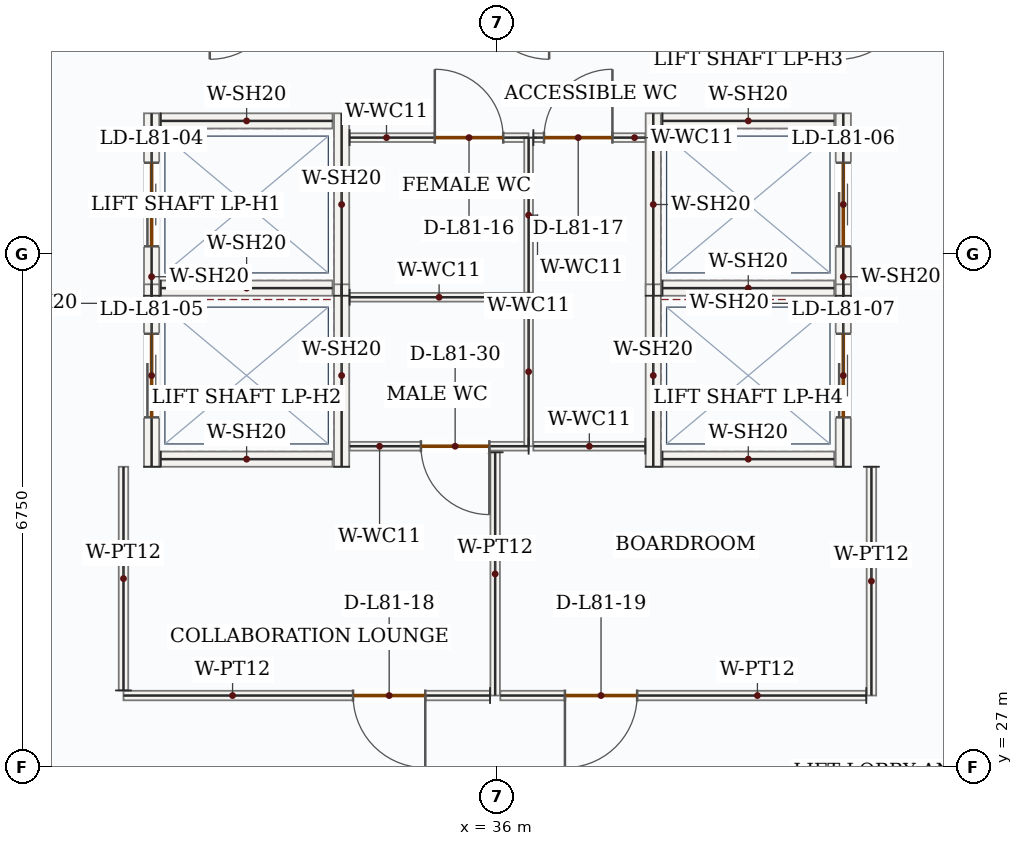
"""IFC4 building model, lengths in metres.
Left out: names, types, materials, properties, quantities, classifications, styles, units other than length and angle.
Written with IfcOpenShell. Run it as: python <this file> out.ifc"""

import sys

from ifc_helpers import new_model, si_unit, direction, frame, frame_2d, origin, place, context, subcontext, project, spatial, rectangle, extrude, source, transform, mapped, element, fill, save


model = new_model("IFC4")
c1 = context("Model", 3, precision=1e-05, world=origin(), true_north=direction((0.0, 1.0)))
c2 = subcontext(c1, "Body", "Model", "MODEL_VIEW")
j1 = project(units=[si_unit("LENGTHUNIT", "METRE"), si_unit("PLANEANGLEUNIT", "RADIAN")], contexts=[c1])
p1 = place(None, origin())
s1 = spatial("IfcSite", under=j1, at=p1, CompositionType="ELEMENT")
p2 = place(p1, origin())
s2 = spatial("IfcBuilding", under=s1, at=p2, CompositionType="ELEMENT")
p3 = place(p2, frame((0.0, 0.0, 334.8)))
s3 = spatial("IfcBuildingStorey", under=s2, at=p3, CompositionType="ELEMENT", Elevation=334.8)
p4 = place(p3, frame((31.45, 33.2, 0.0), z_axis=(0.0, 0.0, 1.0), x_axis=(0.0, 1.0, 0.0)))
e1 = element("IfcWall", 1, at=p4, inside=s3, PredefinedType="SOLIDWALL", context=c2, shape_type="SweptSolid", body=[
    extrude(rectangle(XDim=2.4, YDim=0.2, at=frame_2d((1.2, 0.0))), origin(), (0.0, 0.0, 1.0), 3.5),
])
p5 = place(p4, frame((0.65, 0.0, 0.0)))
e2 = element("IfcOpeningElement", 2, at=p5, cuts=e1, PredefinedType="OPENING", context=c2, shape_type="SweptSolid", body=[
    extrude(rectangle(XDim=1.1, YDim=2.15, at=frame_2d((0.55, 1.075))), frame((0.0, 0.11, 0.0), z_axis=(0.0, -1.0, 0.0), x_axis=(1.0, 0.0, 0.0)), (0.0, 0.0, 1.0), 0.22),
])
m1 = source(origin(), c2, "Body", "SweptSolid", [
    extrude(rectangle(XDim=2.4, YDim=0.2, at=frame_2d((1.2, 0.0))), origin(), (0.0, 0.0, 1.0), 3.5),
])
p6 = place(p3, frame((33.95, 33.2, 0.0), z_axis=(0.0, 0.0, 1.0), x_axis=(0.0, 1.0, 0.0)))
e3 = element("IfcWall", 3, at=p6, inside=s3, PredefinedType="SOLIDWALL", context=c2, shape_type="MappedRepresentation", body=[
    mapped(m1, transform((0.0, 0.0, 0.0), x_axis=(1.0, 0.0, 0.0), y_axis=(0.0, 1.0, 0.0), z_axis=(0.0, 0.0, 1.0), scale=1.0)),
])
m2 = source(origin(), c2, "Body", "SweptSolid", [
    extrude(rectangle(XDim=2.26, YDim=0.2, at=frame_2d((1.13, 0.0))), origin(), (0.0, 0.0, 1.0), 3.5),
])
for number, where, z_axis, x_axis in (
    (4, (31.57, 33.3, 0.0), (0.0, 0.0, 1.0), (1.0, 0.0, 0.0)),
    (5, (31.57, 35.5, 0.0), (0.0, 0.0, 1.0), (1.0, 0.0, 0.0)),
):
    element("IfcWall", number, at=place(p3, frame(where, z_axis=z_axis, x_axis=x_axis)), inside=s3, PredefinedType="SOLIDWALL", context=c2, shape_type="MappedRepresentation", body=[
        mapped(m2, transform((0.0, 0.0, 0.0), x_axis=(1.0, 0.0, 0.0), y_axis=(0.0, 1.0, 0.0), z_axis=(0.0, 0.0, 1.0), scale=1.0)),
    ])
p7 = place(p3, frame((31.45, 30.95, 0.0), z_axis=(0.0, 0.0, 1.0), x_axis=(0.0, 1.0, 0.0)))
e6 = element("IfcWall", 6, at=p7, inside=s3, PredefinedType="SOLIDWALL", context=c2, shape_type="SweptSolid", body=[
    extrude(rectangle(XDim=2.4, YDim=0.2, at=frame_2d((1.2, 0.0))), origin(), (0.0, 0.0, 1.0), 3.5),
])
p8 = place(p7, frame((0.65, 0.0, 0.0)))
e7 = element("IfcOpeningElement", 7, at=p8, cuts=e6, PredefinedType="OPENING", context=c2, shape_type="SweptSolid", body=[
    extrude(rectangle(XDim=1.1, YDim=2.15, at=frame_2d((0.55, 1.075))), frame((0.0, 0.11, 0.0), z_axis=(0.0, -1.0, 0.0), x_axis=(1.0, 0.0, 0.0)), (0.0, 0.0, 1.0), 0.22),
])
p9 = place(p3, frame((33.95, 30.95, 0.0), z_axis=(0.0, 0.0, 1.0), x_axis=(0.0, 1.0, 0.0)))
e8 = element("IfcWall", 8, at=p9, inside=s3, PredefinedType="SOLIDWALL", context=c2, shape_type="MappedRepresentation", body=[
    mapped(m1, transform((0.0, 0.0, 0.0), x_axis=(1.0, 0.0, 0.0), y_axis=(0.0, 1.0, 0.0), z_axis=(0.0, 0.0, 1.0), scale=1.0)),
])
p10 = place(p3, frame((31.57, 31.05, 0.0), z_axis=(0.0, 0.0, 1.0), x_axis=(1.0, 0.0, 0.0)))
e9 = element("IfcWall", 9, at=p10, inside=s3, PredefinedType="SOLIDWALL", context=c2, shape_type="MappedRepresentation", body=[
    mapped(m2, transform((0.0, 0.0, 0.0), x_axis=(1.0, 0.0, 0.0), y_axis=(0.0, 1.0, 0.0), z_axis=(0.0, 0.0, 1.0), scale=1.0)),
])
p11 = place(p3, frame((38.05, 33.2, 0.0), z_axis=(0.0, 0.0, 1.0), x_axis=(0.0, 1.0, 0.0)))
e10 = element("IfcWall", 10, at=p11, inside=s3, PredefinedType="SOLIDWALL", context=c2, shape_type="MappedRepresentation", body=[
    mapped(m1, transform((0.0, 0.0, 0.0), x_axis=(1.0, 0.0, 0.0), y_axis=(0.0, 1.0, 0.0), z_axis=(0.0, 0.0, 1.0), scale=1.0)),
])
p12 = place(p3, frame((40.55, 33.2, 0.0), z_axis=(0.0, 0.0, 1.0), x_axis=(0.0, 1.0, 0.0)))
e11 = element("IfcWall", 11, at=p12, inside=s3, PredefinedType="SOLIDWALL", context=c2, shape_type="SweptSolid", body=[
    extrude(rectangle(XDim=2.4, YDim=0.2, at=frame_2d((1.2, 0.0))), origin(), (0.0, 0.0, 1.0), 3.5),
])
p13 = place(p12, frame((0.65, 0.0, 0.0)))
e12 = element("IfcOpeningElement", 12, at=p13, cuts=e11, PredefinedType="OPENING", context=c2, shape_type="SweptSolid", body=[
    extrude(rectangle(XDim=1.1, YDim=2.15, at=frame_2d((0.55, 1.075))), frame((0.0, 0.11, 0.0), z_axis=(0.0, -1.0, 0.0), x_axis=(1.0, 0.0, 0.0)), (0.0, 0.0, 1.0), 0.22),
])
for number, where, z_axis, x_axis in (
    (13, (38.17, 33.3, 0.0), (0.0, 0.0, 1.0), (1.0, 0.0, 0.0)),
    (14, (38.17, 35.5, 0.0), (0.0, 0.0, 1.0), (1.0, 0.0, 0.0)),
):
    element("IfcWall", number, at=place(p3, frame(where, z_axis=z_axis, x_axis=x_axis)), inside=s3, PredefinedType="SOLIDWALL", context=c2, shape_type="MappedRepresentation", body=[
        mapped(m2, transform((0.0, 0.0, 0.0), x_axis=(1.0, 0.0, 0.0), y_axis=(0.0, 1.0, 0.0), z_axis=(0.0, 0.0, 1.0), scale=1.0)),
    ])
p14 = place(p3, frame((38.05, 30.95, 0.0), z_axis=(0.0, 0.0, 1.0), x_axis=(0.0, 1.0, 0.0)))
e15 = element("IfcWall", 15, at=p14, inside=s3, PredefinedType="SOLIDWALL", context=c2, shape_type="MappedRepresentation", body=[
    mapped(m1, transform((0.0, 0.0, 0.0), x_axis=(1.0, 0.0, 0.0), y_axis=(0.0, 1.0, 0.0), z_axis=(0.0, 0.0, 1.0), scale=1.0)),
])
p15 = place(p3, frame((40.55, 30.95, 0.0), z_axis=(0.0, 0.0, 1.0), x_axis=(0.0, 1.0, 0.0)))
e16 = element("IfcWall", 16, at=p15, inside=s3, PredefinedType="SOLIDWALL", context=c2, shape_type="SweptSolid", body=[
    extrude(rectangle(XDim=2.4, YDim=0.2, at=frame_2d((1.2, 0.0))), origin(), (0.0, 0.0, 1.0), 3.5),
])
p16 = place(p15, frame((0.65, 0.0, 0.0)))
e17 = element("IfcOpeningElement", 17, at=p16, cuts=e16, PredefinedType="OPENING", context=c2, shape_type="SweptSolid", body=[
    extrude(rectangle(XDim=1.1, YDim=2.15, at=frame_2d((0.55, 1.075))), frame((0.0, 0.11, 0.0), z_axis=(0.0, -1.0, 0.0), x_axis=(1.0, 0.0, 0.0)), (0.0, 0.0, 1.0), 0.22),
])
p17 = place(p3, frame((38.17, 31.05, 0.0), z_axis=(0.0, 0.0, 1.0), x_axis=(1.0, 0.0, 0.0)))
e18 = element("IfcWall", 18, at=p17, inside=s3, PredefinedType="SOLIDWALL", context=c2, shape_type="MappedRepresentation", body=[
    mapped(m2, transform((0.0, 0.0, 0.0), x_axis=(1.0, 0.0, 0.0), y_axis=(0.0, 1.0, 0.0), z_axis=(0.0, 0.0, 1.0), scale=1.0)),
])
p18 = place(p3, frame((36.41, 31.22, 0.0), z_axis=(0.0, 0.0, 1.0), x_axis=(-1.0, 0.0, 0.0)))
e19 = element("IfcWall", 19, at=p18, inside=s3, PredefinedType="PARTITIONING", context=c2, shape_type="SweptSolid", body=[
    extrude(rectangle(XDim=2.355, YDim=0.115, at=frame_2d((1.177, 0.0))), origin(), (0.0, 0.0, 1.0), 3.5),
])
p19 = place(p18, frame((0.517, 0.0, 0.0)))
e20 = element("IfcOpeningElement", 20, at=p19, cuts=e19, PredefinedType="OPENING", context=c2, shape_type="SweptSolid", body=[
    extrude(rectangle(XDim=0.9, YDim=2.1, at=frame_2d((0.45, 1.05))), frame((0.0, 0.067, 0.0), z_axis=(0.0, -1.0, 0.0), x_axis=(1.0, 0.0, 0.0)), (0.0, 0.0, 1.0), 0.135),
])
m3 = source(origin(), c2, "Body", "SweptSolid", [
    extrude(rectangle(XDim=2.355, YDim=0.115, at=frame_2d((1.177, 0.0))), origin(), (0.0, 0.0, 1.0), 3.5),
])
p20 = place(p3, frame((34.055, 33.18, 0.0), z_axis=(0.0, 0.0, 1.0), x_axis=(1.0, 0.0, 0.0)))
e21 = element("IfcWall", 21, at=p20, inside=s3, PredefinedType="PARTITIONING", context=c2, shape_type="MappedRepresentation", body=[
    mapped(m3, transform((0.0, 0.0, 0.0), x_axis=(1.0, 0.0, 0.0), y_axis=(0.0, 1.0, 0.0), z_axis=(0.0, 0.0, 1.0), scale=1.0)),
])
m4 = source(origin(), c2, "Body", "SweptSolid", [
    extrude(rectangle(XDim=1.96, YDim=0.115, at=frame_2d((0.98, 0.0))), origin(), (0.0, 0.0, 1.0), 3.5),
])
p21 = place(p3, frame((36.41, 33.18, 0.0), z_axis=(0.0, 0.0, 1.0), x_axis=(0.0, -1.0, 0.0)))
e22 = element("IfcWall", 22, at=p21, inside=s3, PredefinedType="PARTITIONING", context=c2, shape_type="MappedRepresentation", body=[
    mapped(m4, transform((0.0, 0.0, 0.0), x_axis=(1.0, 0.0, 0.0), y_axis=(0.0, 1.0, 0.0), z_axis=(0.0, 0.0, 1.0), scale=1.0)),
])
p22 = place(p3, frame((34.055, 35.28, 0.0), z_axis=(0.0, 0.0, 1.0), x_axis=(1.0, 0.0, 0.0)))
e23 = element("IfcWall", 23, at=p22, inside=s3, PredefinedType="PARTITIONING", context=c2, shape_type="SweptSolid", body=[
    extrude(rectangle(XDim=2.355, YDim=0.115, at=frame_2d((1.177, 0.0))), origin(), (0.0, 0.0, 1.0), 3.5),
])
p23 = place(p22, frame((1.121, 0.0, 0.0)))
e24 = element("IfcOpeningElement", 24, at=p23, cuts=e23, PredefinedType="OPENING", context=c2, shape_type="SweptSolid", body=[
    extrude(rectangle(XDim=0.9, YDim=2.1, at=frame_2d((0.45, 1.05))), frame((0.0, 0.067, 0.0), z_axis=(0.0, -1.0, 0.0), x_axis=(1.0, 0.0, 0.0)), (0.0, 0.0, 1.0), 0.135),
])
m5 = source(origin(), c2, "Body", "SweptSolid", [
    extrude(rectangle(XDim=2.04, YDim=0.115, at=frame_2d((1.02, 0.0))), origin(), (0.0, 0.0, 1.0), 3.5),
])
p24 = place(p3, frame((36.41, 35.28, 0.0), z_axis=(0.0, 0.0, 1.0), x_axis=(0.0, -1.0, 0.0)))
e25 = element("IfcWall", 25, at=p24, inside=s3, PredefinedType="PARTITIONING", context=c2, shape_type="MappedRepresentation", body=[
    mapped(m5, transform((0.0, 0.0, 0.0), x_axis=(1.0, 0.0, 0.0), y_axis=(0.0, 1.0, 0.0), z_axis=(0.0, 0.0, 1.0), scale=1.0)),
])
m6 = source(origin(), c2, "Body", "SweptSolid", [
    extrude(rectangle(XDim=1.473, YDim=0.115, at=frame_2d((0.736, 0.0))), origin(), (0.0, 0.0, 1.0), 3.5),
])
p25 = place(p3, frame((37.945, 31.22, 0.0), z_axis=(0.0, 0.0, 1.0), x_axis=(-1.0, 0.0, 0.0)))
e26 = element("IfcWall", 26, at=p25, inside=s3, PredefinedType="PARTITIONING", context=c2, shape_type="MappedRepresentation", body=[
    mapped(m6, transform((0.0, 0.0, 0.0), x_axis=(1.0, 0.0, 0.0), y_axis=(0.0, 1.0, 0.0), z_axis=(0.0, 0.0, 1.0), scale=1.0)),
])
p26 = place(p3, frame((36.472, 35.28, 0.0), z_axis=(0.0, 0.0, 1.0), x_axis=(1.0, 0.0, 0.0)))
e27 = element("IfcWall", 27, at=p26, inside=s3, PredefinedType="PARTITIONING", context=c2, shape_type="SweptSolid", body=[
    extrude(rectangle(XDim=1.473, YDim=0.115, at=frame_2d((0.736, 0.0))), origin(), (0.0, 0.0, 1.0), 3.5),
])
p27 = place(p26, frame((0.14, 0.0, 0.0)))
e28 = element("IfcOpeningElement", 28, at=p27, cuts=e27, PredefinedType="OPENING", context=c2, shape_type="SweptSolid", body=[
    extrude(rectangle(XDim=0.9, YDim=2.1, at=frame_2d((0.45, 1.05))), frame((0.0, 0.067, 0.0), z_axis=(0.0, -1.0, 0.0), x_axis=(1.0, 0.0, 0.0)), (0.0, 0.0, 1.0), 0.135),
])
m7 = source(origin(), c2, "Body", "SweptSolid", [
    extrude(rectangle(XDim=3.2, YDim=0.125, at=frame_2d((1.6, 0.0))), origin(), (0.0, 0.0, 1.0), 3.5),
])
p28 = place(p3, frame((35.97, 31.14, 0.0), z_axis=(0.0, 0.0, 1.0), x_axis=(0.0, -1.0, 0.0)))
e29 = element("IfcWall", 29, at=p28, inside=s3, PredefinedType="PARTITIONING", context=c2, shape_type="MappedRepresentation", body=[
    mapped(m7, transform((0.0, 0.0, 0.0), x_axis=(1.0, 0.0, 0.0), y_axis=(0.0, 1.0, 0.0), z_axis=(0.0, 0.0, 1.0), scale=1.0)),
])
p29 = place(p3, frame((35.903, 27.94, 0.0), z_axis=(0.0, 0.0, 1.0), x_axis=(-1.0, 0.0, 0.0)))
e30 = element("IfcWall", 30, at=p29, inside=s3, PredefinedType="PARTITIONING", context=c2, shape_type="SweptSolid", body=[
    extrude(rectangle(XDim=4.823, YDim=0.125, at=frame_2d((2.411, 0.0))), origin(), (0.0, 0.0, 1.0), 3.5),
])
p30 = place(p29, frame((0.852, 0.0, 0.0)))
e31 = element("IfcOpeningElement", 31, at=p30, cuts=e30, PredefinedType="OPENING", context=c2, shape_type="SweptSolid", body=[
    extrude(rectangle(XDim=0.95, YDim=2.15, at=frame_2d((0.475, 1.075))), frame((0.0, 0.073, 0.0), z_axis=(0.0, -1.0, 0.0), x_axis=(1.0, 0.0, 0.0)), (0.0, 0.0, 1.0), 0.145),
])
m8 = source(origin(), c2, "Body", "SweptSolid", [
    extrude(rectangle(XDim=2.942, YDim=0.125, at=frame_2d((1.471, 0.0))), origin(), (0.0, 0.0, 1.0), 3.5),
])
p31 = place(p3, frame((31.08, 28.008, 0.0), z_axis=(0.0, 0.0, 1.0), x_axis=(0.0, 1.0, 0.0)))
e32 = element("IfcWall", 32, at=p31, inside=s3, PredefinedType="PARTITIONING", context=c2, shape_type="MappedRepresentation", body=[
    mapped(m8, transform((0.0, 0.0, 0.0), x_axis=(1.0, 0.0, 0.0), y_axis=(0.0, 1.0, 0.0), z_axis=(0.0, 0.0, 1.0), scale=1.0)),
])
m9 = source(origin(), c2, "Body", "SweptSolid", [
    extrude(rectangle(XDim=3.01, YDim=0.125, at=frame_2d((1.505, 0.0))), origin(), (0.0, 0.0, 1.0), 3.5),
])
p32 = place(p3, frame((40.92, 30.95, 0.0), z_axis=(0.0, 0.0, 1.0), x_axis=(0.0, -1.0, 0.0)))
e33 = element("IfcWall", 33, at=p32, inside=s3, PredefinedType="PARTITIONING", context=c2, shape_type="MappedRepresentation", body=[
    mapped(m9, transform((0.0, 0.0, 0.0), x_axis=(1.0, 0.0, 0.0), y_axis=(0.0, 1.0, 0.0), z_axis=(0.0, 0.0, 1.0), scale=1.0)),
])
p33 = place(p3, frame((40.853, 27.94, 0.0), z_axis=(0.0, 0.0, 1.0), x_axis=(-1.0, 0.0, 0.0)))
e34 = element("IfcWall", 34, at=p33, inside=s3, PredefinedType="PARTITIONING", context=c2, shape_type="SweptSolid", body=[
    extrude(rectangle(XDim=4.815, YDim=0.125, at=frame_2d((2.407, 0.0))), origin(), (0.0, 0.0, 1.0), 3.5),
])
p34 = place(p33, frame((3.015, 0.0, 0.0)))
e35 = element("IfcOpeningElement", 35, at=p34, cuts=e34, PredefinedType="OPENING", context=c2, shape_type="SweptSolid", body=[
    extrude(rectangle(XDim=0.95, YDim=2.15, at=frame_2d((0.475, 1.075))), frame((0.0, 0.073, 0.0), z_axis=(0.0, -1.0, 0.0), x_axis=(1.0, 0.0, 0.0)), (0.0, 0.0, 1.0), 0.145),
])
m10 = source(origin(), c2, "Body", "SweptSolid", [
    extrude(rectangle(XDim=1.1, YDim=2.15, at=frame_2d((0.55, 1.075))), frame((0.0, 0.025, 0.0), z_axis=(0.0, -1.0, 0.0), x_axis=(1.0, 0.0, 0.0)), (0.0, 0.0, 1.0), 0.05),
])
p35 = place(p5, origin())
e36 = element("IfcDoor", 36, at=p35, inside=s3, OperationType="DOUBLE_DOOR_SLIDING", PredefinedType="DOOR", context=c2, shape_type="MappedRepresentation", body=[
    mapped(m10, transform((0.0, 0.0, 0.0), x_axis=(1.0, 0.0, 0.0), y_axis=(0.0, 1.0, 0.0), z_axis=(0.0, 0.0, 1.0), scale=1.0)),
])
fill(e2, e36)
p36 = place(p8, origin())
e37 = element("IfcDoor", 37, at=p36, inside=s3, OperationType="DOUBLE_DOOR_SLIDING", PredefinedType="DOOR", context=c2, shape_type="MappedRepresentation", body=[
    mapped(m10, transform((0.0, 0.0, 0.0), x_axis=(1.0, 0.0, 0.0), y_axis=(0.0, 1.0, 0.0), z_axis=(0.0, 0.0, 1.0), scale=1.0)),
])
fill(e7, e37)
p37 = place(p13, origin())
e38 = element("IfcDoor", 38, at=p37, inside=s3, OperationType="DOUBLE_DOOR_SLIDING", PredefinedType="DOOR", context=c2, shape_type="MappedRepresentation", body=[
    mapped(m10, transform((0.0, 0.0, 0.0), x_axis=(1.0, 0.0, 0.0), y_axis=(0.0, 1.0, 0.0), z_axis=(0.0, 0.0, 1.0), scale=1.0)),
])
fill(e12, e38)
p38 = place(p16, origin())
e39 = element("IfcDoor", 39, at=p38, inside=s3, OperationType="DOUBLE_DOOR_SLIDING", PredefinedType="DOOR", context=c2, shape_type="MappedRepresentation", body=[
    mapped(m10, transform((0.0, 0.0, 0.0), x_axis=(1.0, 0.0, 0.0), y_axis=(0.0, 1.0, 0.0), z_axis=(0.0, 0.0, 1.0), scale=1.0)),
])
fill(e17, e39)
m11 = source(origin(), c2, "Body", "SweptSolid", [
    extrude(rectangle(XDim=0.9, YDim=2.1, at=frame_2d((0.45, 1.05))), frame((0.0, 0.025, 0.0), z_axis=(0.0, -1.0, 0.0), x_axis=(1.0, 0.0, 0.0)), (0.0, 0.0, 1.0), 0.05),
])
p39 = place(p23, origin())
e40 = element("IfcDoor", 40, at=p39, inside=s3, OperationType="SINGLE_SWING_LEFT", PredefinedType="DOOR", context=c2, shape_type="MappedRepresentation", body=[
    mapped(m11, transform((0.0, 0.0, 0.0), x_axis=(1.0, 0.0, 0.0), y_axis=(0.0, 1.0, 0.0), z_axis=(0.0, 0.0, 1.0), scale=1.0)),
])
fill(e24, e40)
p40 = place(p27, origin())
e41 = element("IfcDoor", 41, at=p40, inside=s3, OperationType="SINGLE_SWING_RIGHT", PredefinedType="DOOR", context=c2, shape_type="MappedRepresentation", body=[
    mapped(m11, transform((0.0, 0.0, 0.0), x_axis=(1.0, 0.0, 0.0), y_axis=(0.0, 1.0, 0.0), z_axis=(0.0, 0.0, 1.0), scale=1.0)),
])
fill(e28, e41)
m12 = source(origin(), c2, "Body", "SweptSolid", [
    extrude(rectangle(XDim=0.95, YDim=2.15, at=frame_2d((0.475, 1.075))), frame((0.0, 0.025, 0.0), z_axis=(0.0, -1.0, 0.0), x_axis=(1.0, 0.0, 0.0)), (0.0, 0.0, 1.0), 0.05),
])
p41 = place(p30, origin())
e42 = element("IfcDoor", 42, at=p41, inside=s3, OperationType="SINGLE_SWING_LEFT", PredefinedType="DOOR", context=c2, shape_type="MappedRepresentation", body=[
    mapped(m12, transform((0.0, 0.0, 0.0), x_axis=(1.0, 0.0, 0.0), y_axis=(0.0, 1.0, 0.0), z_axis=(0.0, 0.0, 1.0), scale=1.0)),
])
fill(e31, e42)
p42 = place(p34, origin())
e43 = element("IfcDoor", 43, at=p42, inside=s3, OperationType="SINGLE_SWING_RIGHT", PredefinedType="DOOR", context=c2, shape_type="MappedRepresentation", body=[
    mapped(m12, transform((0.0, 0.0, 0.0), x_axis=(1.0, 0.0, 0.0), y_axis=(0.0, 1.0, 0.0), z_axis=(0.0, 0.0, 1.0), scale=1.0)),
])
fill(e35, e43)
p43 = place(p19, origin())
e44 = element("IfcDoor", 44, at=p43, inside=s3, OperationType="SINGLE_SWING_LEFT", PredefinedType="DOOR", context=c2, shape_type="MappedRepresentation", body=[
    mapped(m11, transform((0.0, 0.0, 0.0), x_axis=(1.0, 0.0, 0.0), y_axis=(0.0, 1.0, 0.0), z_axis=(0.0, 0.0, 1.0), scale=1.0)),
])
fill(e20, e44)
save(model, sys.argv[1])
